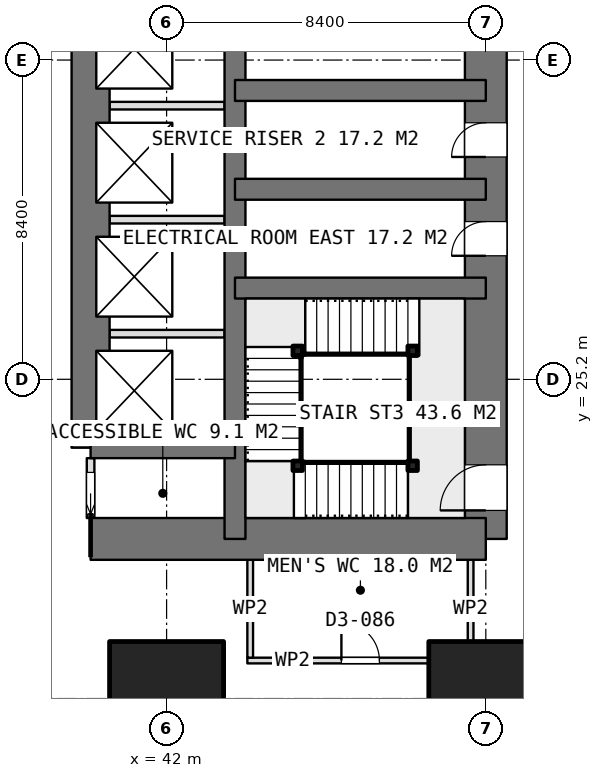
"""IFC4 building model, lengths in metres.
Left out: names, types, materials, properties, quantities, classifications, styles, units other than length and angle.
Written with IfcOpenShell. Run it as: python <this file> out.ifc"""

import sys

from ifc_helpers import new_model, si_unit, direction, frame, frame_2d, origin, origin_2d, place, context, subcontext, project, spatial, rectangle, extrude, element, fill, save


model = new_model("IFC4")
c1 = context("Model", 3, precision=1e-05, world=origin(), true_north=direction((0.0, 1.0)))
c2 = subcontext(c1, "Body", "Model", "MODEL_VIEW")
j1 = project(units=[si_unit("LENGTHUNIT", "METRE"), si_unit("PLANEANGLEUNIT", "RADIAN")], contexts=[c1])
p1 = place(None, origin())
s1 = spatial("IfcSite", under=j1, at=p1, CompositionType="ELEMENT")
p2 = place(p1, origin())
s2 = spatial("IfcBuilding", under=s1, at=p2, CompositionType="ELEMENT")
p3 = place(p2, frame((0.0, 0.0, 77.9)))
s3 = spatial("IfcBuildingStorey", under=s2, at=p3, CompositionType="ELEMENT", Elevation=77.9)
p4 = place(p3, frame((40.0, 21.0, 0.0), z_axis=(0.0, 0.0, 1.0), x_axis=(1.0, 0.0, 0.0)))
e1 = element("IfcWall", 1, at=p4, inside=s3, PredefinedType="SHEAR", context=c2, shape_type="SweptSolid", body=[
    extrude(rectangle(XDim=10.4, YDim=1.1, at=frame_2d((5.2, 0.0))), origin(), (0.0, 0.0, 1.0), 3.75),
])
p5 = place(p3, frame((50.4, 21.0, 0.0), z_axis=(0.0, 0.0, 1.0), x_axis=(0.0, 1.0, 0.0)))
e2 = element("IfcWall", 2, at=p5, inside=s3, PredefinedType="SHEAR", context=c2, shape_type="SweptSolid", body=[
    extrude(rectangle(XDim=25.2, YDim=1.1, at=frame_2d((12.6, 0.0))), origin(), (0.0, 0.0, 1.0), 3.75),
])
p6 = place(p5, frame((16.2, 0.0, 0.0)))
e3 = element("IfcOpeningElement", 3, at=p6, cuts=e2, PredefinedType="OPENING", context=c2, shape_type="SweptSolid", body=[
    extrude(rectangle(XDim=1.2, YDim=2.1, at=frame_2d((0.6, 1.05))), frame((0.0, 0.56, 0.0), z_axis=(0.0, -1.0, 0.0), x_axis=(1.0, 0.0, 0.0)), (0.0, 0.0, 1.0), 1.12),
])
p7 = place(p5, frame((10.05, 0.0, 0.0)))
e4 = element("IfcOpeningElement", 4, at=p7, cuts=e2, PredefinedType="OPENING", context=c2, shape_type="SweptSolid", body=[
    extrude(rectangle(XDim=0.9, YDim=2.1, at=frame_2d((0.45, 1.05))), frame((0.0, 0.56, 0.0), z_axis=(0.0, -1.0, 0.0), x_axis=(1.0, 0.0, 0.0)), (0.0, 0.0, 1.0), 1.12),
])
p8 = place(p5, frame((7.45, 0.0, 0.0)))
e5 = element("IfcOpeningElement", 5, at=p8, cuts=e2, PredefinedType="OPENING", context=c2, shape_type="SweptSolid", body=[
    extrude(rectangle(XDim=0.9, YDim=2.1, at=frame_2d((0.45, 1.05))), frame((0.0, 0.56, 0.0), z_axis=(0.0, -1.0, 0.0), x_axis=(1.0, 0.0, 0.0)), (0.0, 0.0, 1.0), 1.12),
])
p9 = place(p5, frame((0.75, 0.0, 0.0)))
e6 = element("IfcOpeningElement", 6, at=p9, cuts=e2, PredefinedType="OPENING", context=c2, shape_type="SweptSolid", body=[
    extrude(rectangle(XDim=1.2, YDim=2.1, at=frame_2d((0.6, 1.05))), frame((0.0, 0.56, 0.0), z_axis=(0.0, -1.0, 0.0), x_axis=(1.0, 0.0, 0.0)), (0.0, 0.0, 1.0), 1.12),
])
p10 = place(p3, frame((43.8, 21.0, 0.0), z_axis=(0.0, 0.0, 1.0), x_axis=(0.0, 1.0, 0.0)))
e7 = element("IfcWall", 7, at=p10, inside=s3, PredefinedType="SHEAR", context=c2, shape_type="SweptSolid", body=[
    extrude(rectangle(XDim=25.2, YDim=0.55, at=frame_2d((12.6, 0.0))), origin(), (0.0, 0.0, 1.0), 3.75),
])
p11 = place(p3, frame((40.0, 23.4, 0.0), z_axis=(0.0, 0.0, 1.0), x_axis=(0.0, 1.0, 0.0)))
e8 = element("IfcWall", 8, at=p11, inside=s3, PredefinedType="SHEAR", context=c2, shape_type="SweptSolid", body=[
    extrude(rectangle(XDim=18.0, YDim=1.0, at=frame_2d((9.0, 0.0))), origin(), (0.0, 0.0, 1.0), 3.75),
])
p12 = place(p3, frame((40.0, 23.4, 0.0), z_axis=(0.0, 0.0, 1.0), x_axis=(1.0, 0.0, 0.0)))
e9 = element("IfcWall", 9, at=p12, inside=s3, PredefinedType="SHEAR", context=c2, shape_type="SweptSolid", body=[
    extrude(rectangle(XDim=3.8, YDim=0.55, at=frame_2d((1.9, 0.0))), origin(), (0.0, 0.0, 1.0), 3.75),
])
for number, where, z_axis, x_axis in (
    (10, (43.8, 27.6, 0.0), (0.0, 0.0, 1.0), (1.0, 0.0, 0.0)),
    (11, (43.8, 30.2, 0.0), (0.0, 0.0, 1.0), (1.0, 0.0, 0.0)),
    (12, (43.8, 32.8, 0.0), (0.0, 0.0, 1.0), (1.0, 0.0, 0.0)),
):
    element("IfcWall", number, at=place(p3, frame(where, z_axis=z_axis, x_axis=x_axis)), inside=s3, PredefinedType="SHEAR", context=c2, shape_type="SweptSolid", body=[
        extrude(rectangle(XDim=6.6, YDim=0.55, at=frame_2d((3.3, 0.0))), origin(), (0.0, 0.0, 1.0), 3.75),
    ])
for number, where, z_axis, x_axis in (
    (13, (42.0, 16.8, 0.0), (0.0, 0.0, 1.0), (1.0, 0.0, 0.0)),
    (14, (50.4, 16.8, 0.0), (0.0, 0.0, 1.0), (1.0, 0.0, 0.0)),
):
    element("IfcColumn", number, at=place(p3, frame(where, z_axis=z_axis, x_axis=x_axis)), inside=s3, PredefinedType="COLUMN", context=c2, shape_type="SweptSolid", body=[
        extrude(rectangle(XDim=3.0, YDim=3.0, at=origin_2d()), origin(), (0.0, 0.0, 1.0), 3.75),
    ])
for number, where, z_axis, x_axis in (
    (15, (40.5, 26.4, 0.0), (0.0, 0.0, 1.0), (1.0, 0.0, 0.0)),
    (16, (40.5, 29.4, 0.0), (0.0, 0.0, 1.0), (1.0, 0.0, 0.0)),
    (17, (40.5, 32.4, 0.0), (0.0, 0.0, 1.0), (1.0, 0.0, 0.0)),
):
    element("IfcWall", number, at=place(p3, frame(where, z_axis=z_axis, x_axis=x_axis)), inside=s3, PredefinedType="PARTITIONING", context=c2, shape_type="SweptSolid", body=[
        extrude(rectangle(XDim=3.025, YDim=0.2, at=frame_2d((1.512, 0.0))), origin(), (0.0, 0.0, 1.0), 3.5),
    ])
p13 = place(p3, frame((40.0, 21.55, 0.0), z_axis=(0.0, 0.0, 1.0), x_axis=(0.0, 1.0, 0.0)))
e18 = element("IfcWall", 18, at=p13, inside=s3, PredefinedType="PARTITIONING", context=c2, shape_type="SweptSolid", body=[
    extrude(rectangle(XDim=1.575, YDim=0.2, at=frame_2d((0.788, 0.0))), origin(), (0.0, 0.0, 1.0), 3.5),
])
p14 = place(p13, frame((0.1, 0.0, 0.0)))
e19 = element("IfcOpeningElement", 19, at=p14, cuts=e18, PredefinedType="OPENING", context=c2, shape_type="SweptSolid", body=[
    extrude(rectangle(XDim=1.1, YDim=2.1, at=frame_2d((0.55, 1.05))), frame((0.0, 0.11, 0.0), z_axis=(0.0, -1.0, 0.0), x_axis=(1.0, 0.0, 0.0)), (0.0, 0.0, 1.0), 0.22),
])
p15 = place(p3, frame((44.125, 17.8, 0.0), z_axis=(0.0, 0.0, 1.0), x_axis=(1.0, 0.0, 0.0)))
e20 = element("IfcWall", 20, at=p15, inside=s3, PredefinedType="PARTITIONING", context=c2, shape_type="SweptSolid", body=[
    extrude(rectangle(XDim=5.95, YDim=0.15, at=frame_2d((2.975, 0.0))), origin(), (0.0, 0.0, 1.0), 3.5),
])
p16 = place(p15, frame((2.475, 0.0, 0.0)))
e21 = element("IfcOpeningElement", 21, at=p16, cuts=e20, PredefinedType="OPENING", context=c2, shape_type="SweptSolid", body=[
    extrude(rectangle(XDim=1.0, YDim=2.1, at=frame_2d((0.5, 1.05))), frame((0.0, 0.085, 0.0), z_axis=(0.0, -1.0, 0.0), x_axis=(1.0, 0.0, 0.0)), (0.0, 0.0, 1.0), 0.17),
])
for number, where, z_axis, x_axis in (
    (22, (44.2, 17.875, 0.0), (0.0, 0.0, 1.0), (0.0, 1.0, 0.0)),
    (23, (50.0, 17.875, 0.0), (0.0, 0.0, 1.0), (0.0, 1.0, 0.0)),
):
    element("IfcWall", number, at=place(p3, frame(where, z_axis=z_axis, x_axis=x_axis)), inside=s3, PredefinedType="PARTITIONING", context=c2, shape_type="SweptSolid", body=[
        extrude(rectangle(XDim=2.575, YDim=0.15, at=frame_2d((1.288, 0.0))), origin(), (0.0, 0.0, 1.0), 3.5),
    ])
for number, where, z_axis, x_axis in (
    (24, (48.475, 22.925, 0.0), (0.0, 0.0, 1.0), (1.0, 0.0, 0.0)),
    (25, (45.45, 22.925, 0.0), (0.0, 0.0, 1.0), (1.0, 0.0, 0.0)),
    (26, (45.45, 25.95, 0.0), (0.0, 0.0, 1.0), (1.0, 0.0, 0.0)),
    (27, (48.475, 25.95, 0.0), (0.0, 0.0, 1.0), (1.0, 0.0, 0.0)),
):
    element("IfcColumn", number, at=place(p3, frame(where, z_axis=z_axis, x_axis=x_axis)), inside=s3, PredefinedType="COLUMN", context=c2, shape_type="SweptSolid", body=[
        extrude(rectangle(XDim=0.25, YDim=0.25, at=origin_2d()), origin(), (0.0, 0.0, 1.0), 3.75),
    ])
p17 = place(p7, origin())
e28 = element("IfcDoor", 28, at=p17, inside=s3, OperationType="SINGLE_SWING_LEFT", PredefinedType="DOOR", context=c2, shape_type="SweptSolid", body=[
    extrude(rectangle(XDim=0.9, YDim=2.1, at=frame_2d((0.45, 1.05))), frame((0.0, 0.025, 0.0), z_axis=(0.0, -1.0, 0.0), x_axis=(1.0, 0.0, 0.0)), (0.0, 0.0, 1.0), 0.05),
])
fill(e4, e28)
p18 = place(p8, origin())
e29 = element("IfcDoor", 29, at=p18, inside=s3, OperationType="SINGLE_SWING_LEFT", PredefinedType="DOOR", context=c2, shape_type="SweptSolid", body=[
    extrude(rectangle(XDim=0.9, YDim=2.1, at=frame_2d((0.45, 1.05))), frame((0.0, 0.025, 0.0), z_axis=(0.0, -1.0, 0.0), x_axis=(1.0, 0.0, 0.0)), (0.0, 0.0, 1.0), 0.05),
])
fill(e5, e29)
p19 = place(p14, origin())
e30 = element("IfcDoor", 30, at=p19, inside=s3, OperationType="SLIDING_TO_LEFT", PredefinedType="DOOR", context=c2, shape_type="SweptSolid", body=[
    extrude(rectangle(XDim=1.1, YDim=2.1, at=frame_2d((0.55, 1.05))), frame((0.0, 0.025, 0.0), z_axis=(0.0, -1.0, 0.0), x_axis=(1.0, 0.0, 0.0)), (0.0, 0.0, 1.0), 0.05),
])
fill(e19, e30)
p20 = place(p16, origin())
e31 = element("IfcDoor", 31, at=p20, inside=s3, OperationType="SINGLE_SWING_LEFT", PredefinedType="DOOR", context=c2, shape_type="SweptSolid", body=[
    extrude(rectangle(XDim=1.0, YDim=2.1, at=frame_2d((0.5, 1.05))), frame((0.0, 0.025, 0.0), z_axis=(0.0, -1.0, 0.0), x_axis=(1.0, 0.0, 0.0)), (0.0, 0.0, 1.0), 0.05),
])
fill(e21, e31)
p21 = place(p9, origin())
e32 = element("IfcDoor", 32, at=p21, inside=s3, OperationType="SINGLE_SWING_RIGHT", PredefinedType="DOOR", context=c2, shape_type="SweptSolid", body=[
    extrude(rectangle(XDim=1.2, YDim=2.1, at=frame_2d((0.6, 1.05))), frame((0.0, 0.025, 0.0), z_axis=(0.0, -1.0, 0.0), x_axis=(1.0, 0.0, 0.0)), (0.0, 0.0, 1.0), 0.05),
])
fill(e6, e32)
save(model, sys.argv[1])
